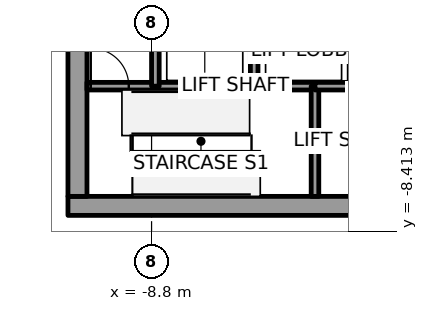
"""IFC4 building model, lengths in metres.
Left out: names, types, materials, properties, quantities, classifications, styles, units other than length and angle.
Written with IfcOpenShell. Run it as: python <this file> out.ifc"""

import sys

from ifc_helpers import new_model, si_unit, direction, frame, frame_2d, origin, place, context, subcontext, project, spatial, rectangle, extrude, element, fill, save


model = new_model("IFC4")
c1 = context("Model", 3, precision=1e-05, world=origin(), true_north=direction((0.0, 1.0)))
c2 = subcontext(c1, "Body", "Model", "MODEL_VIEW")
j1 = project(units=[si_unit("LENGTHUNIT", "METRE"), si_unit("PLANEANGLEUNIT", "RADIAN")], contexts=[c1])
p1 = place(None, origin())
s1 = spatial("IfcSite", under=j1, at=p1, CompositionType="ELEMENT")
p2 = place(p1, origin())
s2 = spatial("IfcBuilding", under=s1, at=p2, CompositionType="ELEMENT")
p3 = place(p2, frame((0.0, 0.0, 137.8)))
s3 = spatial("IfcBuildingStorey", under=s2, at=p3, CompositionType="ELEMENT", Elevation=137.8)
p4 = place(p3, frame((-11.0, -7.75, 0.0), z_axis=(0.0, 0.0, 1.0), x_axis=(1.0, 0.0, 0.0)))
e1 = element("IfcWall", 1, at=p4, inside=s3, PredefinedType="SHEAR", context=c2, shape_type="SweptSolid", body=[
    extrude(rectangle(XDim=22.0, YDim=0.5, at=frame_2d((11.0, 0.0))), origin(), (0.0, 0.0, 1.0), 4.0),
])
p5 = place(p4, frame((10.45, 0.0, 0.0)))
e2 = element("IfcOpeningElement", 2, at=p5, cuts=e1, PredefinedType="OPENING", context=c2, shape_type="SweptSolid", body=[
    extrude(rectangle(XDim=1.1, YDim=2.1, at=frame_2d((0.55, 1.05))), frame((0.0, 0.25, 0.0), z_axis=(0.0, -1.0, 0.0), x_axis=(1.0, 0.0, 0.0)), (0.0, 0.0, 1.0), 0.5),
])
p6 = place(p3, frame((-10.75, -7.5, 0.0), z_axis=(0.0, 0.0, 1.0), x_axis=(0.0, 1.0, 0.0)))
e3 = element("IfcWall", 3, at=p6, inside=s3, PredefinedType="SHEAR", context=c2, shape_type="SweptSolid", body=[
    extrude(rectangle(XDim=15.0, YDim=0.5, at=frame_2d((7.5, 0.0))), origin(), (0.0, 0.0, 1.0), 4.0),
])
p7 = place(p6, frame((6.6, 0.0, 0.0)))
e4 = element("IfcOpeningElement", 4, at=p7, cuts=e3, PredefinedType="OPENING", context=c2, shape_type="SweptSolid", body=[
    extrude(rectangle(XDim=1.8, YDim=2.1, at=frame_2d((0.9, 1.05))), frame((0.0, 0.25, 0.0), z_axis=(0.0, -1.0, 0.0), x_axis=(1.0, 0.0, 0.0)), (0.0, 0.0, 1.0), 0.5),
])
p8 = place(p3, frame((-10.5, -4.6, 0.0), z_axis=(0.0, 0.0, 1.0), x_axis=(1.0, 0.0, 0.0)))
e5 = element("IfcWall", 5, at=p8, inside=s3, PredefinedType="SOLIDWALL", context=c2, shape_type="SweptSolid", body=[
    extrude(rectangle(XDim=1.8, YDim=0.2, at=frame_2d((0.9, 0.0))), origin(), (0.0, 0.0, 1.0), 3.85),
])
p9 = place(p8, frame((0.1, 0.0, 0.0)))
e6 = element("IfcOpeningElement", 6, at=p9, cuts=e5, PredefinedType="OPENING", context=c2, shape_type="SweptSolid", body=[
    extrude(rectangle(XDim=1.0, YDim=2.1, at=frame_2d((0.5, 1.05))), frame((0.0, 0.1, 0.0), z_axis=(0.0, -1.0, 0.0), x_axis=(1.0, 0.0, 0.0)), (0.0, 0.0, 1.0), 0.2),
])
p10 = place(p3, frame((-8.7, -4.6, 0.0), z_axis=(0.0, 0.0, 1.0), x_axis=(1.0, 0.0, 0.0)))
e7 = element("IfcWall", 7, at=p10, inside=s3, PredefinedType="SOLIDWALL", context=c2, shape_type="SweptSolid", body=[
    extrude(rectangle(XDim=2.6, YDim=0.2, at=frame_2d((1.3, 0.0))), origin(), (0.0, 0.0, 1.0), 3.85),
])
p11 = place(p3, frame((-8.7, -4.6, 0.0), z_axis=(0.0, 0.0, 1.0), x_axis=(0.0, 1.0, 0.0)))
e8 = element("IfcWall", 8, at=p11, inside=s3, PredefinedType="SOLIDWALL", context=c2, shape_type="SweptSolid", body=[
    extrude(rectangle(XDim=2.8, YDim=0.2, at=frame_2d((1.4, 0.0))), origin(), (0.0, 0.0, 1.0), 3.85),
])
p12 = place(p3, frame((-6.1, -4.6, 0.0), z_axis=(0.0, 0.0, 1.0), x_axis=(1.0, 0.0, 0.0)))
e9 = element("IfcWall", 9, at=p12, inside=s3, PredefinedType="SOLIDWALL", context=c2, shape_type="SweptSolid", body=[
    extrude(rectangle(XDim=1.6, YDim=0.2, at=frame_2d((0.8, 0.0))), origin(), (0.0, 0.0, 1.0), 3.85),
])
p13 = place(p3, frame((-6.1, -4.6, 0.0), z_axis=(0.0, 0.0, 1.0), x_axis=(0.0, 1.0, 0.0)))
e10 = element("IfcWall", 10, at=p13, inside=s3, PredefinedType="SOLIDWALL", context=c2, shape_type="SweptSolid", body=[
    extrude(rectangle(XDim=2.8, YDim=0.2, at=frame_2d((1.4, 0.0))), origin(), (0.0, 0.0, 1.0), 3.85),
])
p14 = place(p3, frame((-4.5, -4.6, 0.0), z_axis=(0.0, 0.0, 1.0), x_axis=(0.0, -1.0, 0.0)))
e11 = element("IfcWall", 11, at=p14, inside=s3, PredefinedType="SOLIDWALL", context=c2, shape_type="SweptSolid", body=[
    extrude(rectangle(XDim=2.9, YDim=0.2, at=frame_2d((1.45, 0.0))), origin(), (0.0, 0.0, 1.0), 3.85),
])
p15 = place(p3, frame((-4.5, -4.6, 0.0), z_axis=(0.0, 0.0, 1.0), x_axis=(1.0, 0.0, 0.0)))
e12 = element("IfcWall", 12, at=p15, inside=s3, PredefinedType="SOLIDWALL", context=c2, shape_type="SweptSolid", body=[
    extrude(rectangle(XDim=1.0, YDim=0.2, at=frame_2d((0.5, 0.0))), origin(), (0.0, 0.0, 1.0), 3.85),
])
p16 = place(p9, origin())
e13 = element("IfcDoor", 13, at=p16, inside=s3, OperationType="SINGLE_SWING_LEFT", PredefinedType="DOOR", context=c2, shape_type="SweptSolid", body=[
    extrude(rectangle(XDim=1.0, YDim=2.1, at=frame_2d((0.5, 1.05))), frame((0.0, 0.025, 0.0), z_axis=(0.0, -1.0, 0.0), x_axis=(1.0, 0.0, 0.0)), (0.0, 0.0, 1.0), 0.05),
])
fill(e6, e13)
save(model, sys.argv[1])
